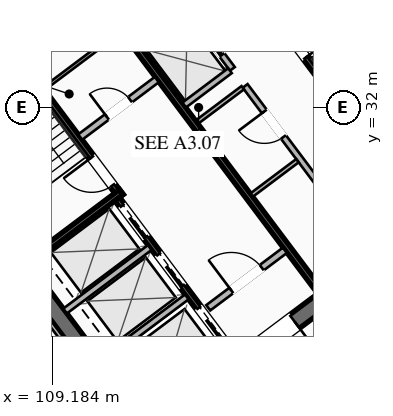
"""IFC4 building model, lengths in metres.
Left out: names, types, materials, properties, quantities, classifications, styles, units other than length and angle.
Written with IfcOpenShell. Run it as: python <this file> out.ifc"""

import sys

from ifc_helpers import new_model, si_unit, direction, frame, frame_2d, origin, place, context, subcontext, project, spatial, rectangle, extrude, element, fill, save


model = new_model("IFC4")
c1 = context("Model", 3, precision=1e-05, world=origin(), true_north=direction((0.0, 1.0)))
c2 = subcontext(c1, "Body", "Model", "MODEL_VIEW")
j1 = project(units=[si_unit("LENGTHUNIT", "METRE"), si_unit("PLANEANGLEUNIT", "RADIAN")], contexts=[c1])
p1 = place(None, origin())
s1 = spatial("IfcSite", under=j1, at=p1, CompositionType="ELEMENT")
p2 = place(p1, origin())
s2 = spatial("IfcBuilding", under=s1, at=p2, CompositionType="ELEMENT")
p3 = place(p2, frame((0.0, 0.0, 142.8)))
s3 = spatial("IfcBuildingStorey", under=s2, at=p3, CompositionType="ELEMENT", Elevation=142.8)
for number, where, z_axis, x_axis in (
    (1, (112.436, 21.077, 0.0), (0.0, 0.0, 1.0), (-0.6, 0.8, 0.0)),
    (2, (115.564, 42.923, 0.0), (0.0, 0.0, 1.0), (0.6, -0.8, 0.0)),
):
    element("IfcWall", number, at=place(p3, frame(where, z_axis=z_axis, x_axis=x_axis)), inside=s3, PredefinedType="SHEAR", context=c2, shape_type="SweptSolid", body=[
        extrude(rectangle(XDim=15.6, YDim=0.55, at=frame_2d((7.8, 0.0))), origin(), (0.0, 0.0, 1.0), 3.55),
    ])
p4 = place(p3, frame((124.539, 30.498, 0.0), z_axis=(0.0, 0.0, 1.0), x_axis=(-0.799998054672, -0.600002593761, 0.0)))
e3 = element("IfcWall", 3, at=p4, inside=s3, PredefinedType="SHEAR", context=c2, shape_type="SweptSolid", body=[
    extrude(rectangle(XDim=15.06, YDim=0.55, at=frame_2d((7.53, 0.0))), origin(), (0.0, 0.0, 1.0), 3.55),
])
p5 = place(p4, frame((9.23, 0.0, 0.0)))
e4 = element("IfcOpeningElement", 4, at=p5, cuts=e3, PredefinedType="OPENING", context=c2, shape_type="SweptSolid", body=[
    extrude(rectangle(XDim=1.25, YDim=2.25, at=frame_2d((0.625, 1.125))), frame((0.0, 0.285, 0.0), z_axis=(0.0, -1.0, 0.0), x_axis=(1.0, 0.0, 0.0)), (0.0, 0.0, 1.0), 0.57),
])
p6 = place(p4, frame((4.18, 0.0, 0.0)))
e5 = element("IfcOpeningElement", 5, at=p6, cuts=e3, PredefinedType="OPENING", context=c2, shape_type="SweptSolid", body=[
    extrude(rectangle(XDim=1.25, YDim=2.25, at=frame_2d((0.625, 1.125))), frame((0.0, 0.285, 0.0), z_axis=(0.0, -1.0, 0.0), x_axis=(1.0, 0.0, 0.0)), (0.0, 0.0, 1.0), 0.57),
])
p7 = place(p3, frame((103.461, 33.502, 0.0), z_axis=(0.0, 0.0, 1.0), x_axis=(0.799998054672, 0.600002593761, 0.0)))
e6 = element("IfcWall", 6, at=p7, inside=s3, PredefinedType="SHEAR", context=c2, shape_type="SweptSolid", body=[
    extrude(rectangle(XDim=15.06, YDim=0.55, at=frame_2d((7.53, 0.0))), origin(), (0.0, 0.0, 1.0), 3.55),
])
p8 = place(p7, frame((4.58, 0.0, 0.0)))
e7 = element("IfcOpeningElement", 7, at=p8, cuts=e6, PredefinedType="OPENING", context=c2, shape_type="SweptSolid", body=[
    extrude(rectangle(XDim=1.25, YDim=2.25, at=frame_2d((0.625, 1.125))), frame((0.0, 0.285, 0.0), z_axis=(0.0, -1.0, 0.0), x_axis=(1.0, 0.0, 0.0)), (0.0, 0.0, 1.0), 0.57),
])
p9 = place(p7, frame((9.63, 0.0, 0.0)))
e8 = element("IfcOpeningElement", 8, at=p9, cuts=e6, PredefinedType="OPENING", context=c2, shape_type="SweptSolid", body=[
    extrude(rectangle(XDim=1.25, YDim=2.25, at=frame_2d((0.625, 1.125))), frame((0.0, 0.285, 0.0), z_axis=(0.0, -1.0, 0.0), x_axis=(1.0, 0.0, 0.0)), (0.0, 0.0, 1.0), 0.57),
])
p10 = place(p3, frame((111.44, 29.08, 0.0), z_axis=(0.0, 0.0, 1.0), x_axis=(-0.59999029481, 0.8000072788, 0.0)))
e9 = element("IfcWall", 9, at=p10, inside=s3, PredefinedType="SHEAR", context=c2, shape_type="SweptSolid", body=[
    extrude(rectangle(XDim=8.05, YDim=0.2, at=frame_2d((4.025, 0.0))), origin(), (0.0, 0.0, 1.0), 3.37),
])
p11 = place(p10, frame((0.45, 0.0, 0.0)))
e10 = element("IfcOpeningElement", 10, at=p11, cuts=e9, PredefinedType="OPENING", context=c2, shape_type="SweptSolid", body=[
    extrude(rectangle(XDim=1.15, YDim=2.2, at=frame_2d((0.575, 1.1))), frame((0.0, 0.11, 0.0), z_axis=(0.0, -1.0, 0.0), x_axis=(1.0, 0.0, 0.0)), (0.0, 0.0, 1.0), 0.22),
])
p12 = place(p3, frame((108.396, 26.922, 0.0), z_axis=(0.0, 0.0, 1.0), x_axis=(0.800015298837, 0.599979601008, 0.0)))
e11 = element("IfcWall", 11, at=p12, inside=s3, PredefinedType="SHEAR", context=c2, shape_type="SweptSolid", body=[
    extrude(rectangle(XDim=3.83, YDim=0.2, at=frame_2d((1.915, 0.0))), origin(), (0.0, 0.0, 1.0), 3.37),
])
p13 = place(p3, frame((116.56, 34.92, 0.0), z_axis=(0.0, 0.0, 1.0), x_axis=(0.59999029481, -0.8000072788, 0.0)))
e12 = element("IfcWall", 12, at=p13, inside=s3, PredefinedType="SHEAR", context=c2, shape_type="SweptSolid", body=[
    extrude(rectangle(XDim=8.05, YDim=0.2, at=frame_2d((4.025, 0.0))), origin(), (0.0, 0.0, 1.0), 3.37),
])
p14 = place(p13, frame((0.45, 0.0, 0.0)))
e13 = element("IfcOpeningElement", 13, at=p14, cuts=e12, PredefinedType="OPENING", context=c2, shape_type="SweptSolid", body=[
    extrude(rectangle(XDim=1.15, YDim=2.2, at=frame_2d((0.575, 1.1))), frame((0.0, 0.11, 0.0), z_axis=(0.0, -1.0, 0.0), x_axis=(1.0, 0.0, 0.0)), (0.0, 0.0, 1.0), 0.22),
])
p15 = place(p3, frame((117.998, 25.936, 0.0), z_axis=(0.0, 0.0, 1.0), x_axis=(-0.600002693989, 0.799997979501, 0.0)))
e14 = element("IfcWall", 14, at=p15, inside=s3, PredefinedType="SHEAR", context=c2, shape_type="SweptSolid", body=[
    extrude(rectangle(XDim=14.5, YDim=0.2, at=frame_2d((7.25, 0.0))), origin(), (0.0, 0.0, 1.0), 3.37),
])
p16 = place(p3, frame((110.104, 31.028, 0.0), z_axis=(0.0, 0.0, 1.0), x_axis=(0.800018601094, 0.59997519774, 0.0)))
e15 = element("IfcWall", 15, at=p16, inside=s3, PredefinedType="SOLIDWALL", context=c2, shape_type="SweptSolid", body=[
    extrude(rectangle(XDim=3.15, YDim=0.22, at=frame_2d((1.575, 0.0))), origin(), (0.0, 0.0, 1.0), 2.723),
])
p17 = place(p16, frame((1.1, 0.0, 0.0)))
e16 = element("IfcOpeningElement", 16, at=p17, cuts=e15, PredefinedType="OPENING", context=c2, shape_type="SweptSolid", body=[
    extrude(rectangle(XDim=0.95, YDim=2.05, at=frame_2d((0.475, 1.025))), frame((0.0, 0.12, 0.0), z_axis=(0.0, -1.0, 0.0), x_axis=(1.0, 0.0, 0.0)), (0.0, 0.0, 1.0), 0.24),
])
p18 = place(p3, frame((114.316, 25.412, 0.0), z_axis=(0.0, 0.0, 1.0), x_axis=(0.800018601094, 0.59997519774, 0.0)))
e17 = element("IfcWall", 17, at=p18, inside=s3, PredefinedType="SOLIDWALL", context=c2, shape_type="SweptSolid", body=[
    extrude(rectangle(XDim=3.15, YDim=0.22, at=frame_2d((1.575, 0.0))), origin(), (0.0, 0.0, 1.0), 2.723),
])
p19 = place(p18, frame((0.95, 0.0, 0.0)))
e18 = element("IfcOpeningElement", 18, at=p19, cuts=e17, PredefinedType="OPENING", context=c2, shape_type="SweptSolid", body=[
    extrude(rectangle(XDim=1.25, YDim=2.25, at=frame_2d((0.625, 1.125))), frame((0.0, 0.12, 0.0), z_axis=(0.0, -1.0, 0.0), x_axis=(1.0, 0.0, 0.0)), (0.0, 0.0, 1.0), 0.24),
])
p20 = place(p3, frame((115.19, 23.83, 0.0), z_axis=(0.0, 0.0, 1.0), x_axis=(-0.599993943644, 0.800004542231, 0.0)))
e19 = element("IfcWall", 19, at=p20, inside=s3, PredefinedType="SHEAR", context=c2, shape_type="SweptSolid", body=[
    extrude(rectangle(XDim=6.45, YDim=0.2, at=frame_2d((3.225, 0.0))), origin(), (0.0, 0.0, 1.0), 3.37),
])
p21 = place(p20, frame((4.875, 0.0, 0.0)))
e20 = element("IfcOpeningElement", 20, at=p21, cuts=e19, PredefinedType="OPENING", context=c2, shape_type="SweptSolid", body=[
    extrude(rectangle(XDim=1.3, YDim=2.25, at=frame_2d((0.65, 1.125))), frame((0.0, 0.11, 0.0), z_axis=(0.0, -1.0, 0.0), x_axis=(1.0, 0.0, 0.0)), (0.0, 0.0, 1.0), 0.22),
])
p22 = place(p20, frame((2.875, 0.0, 0.0)))
e21 = element("IfcOpeningElement", 21, at=p22, cuts=e19, PredefinedType="OPENING", context=c2, shape_type="SweptSolid", body=[
    extrude(rectangle(XDim=1.3, YDim=2.25, at=frame_2d((0.65, 1.125))), frame((0.0, 0.11, 0.0), z_axis=(0.0, -1.0, 0.0), x_axis=(1.0, 0.0, 0.0)), (0.0, 0.0, 1.0), 0.22),
])
p23 = place(p20, frame((0.675, 0.0, 0.0)))
e22 = element("IfcOpeningElement", 22, at=p23, cuts=e19, PredefinedType="OPENING", context=c2, shape_type="SweptSolid", body=[
    extrude(rectangle(XDim=1.3, YDim=2.25, at=frame_2d((0.65, 1.125))), frame((0.0, 0.11, 0.0), z_axis=(0.0, -1.0, 0.0), x_axis=(1.0, 0.0, 0.0)), (0.0, 0.0, 1.0), 0.22),
])
for number, where, z_axis, x_axis in (
    (23, (110.826, 23.682, 0.0), (0.0, 0.0, 1.0), (0.8, 0.6, 0.0)),
    (24, (109.608, 25.306, 0.0), (0.0, 0.0, 1.0), (0.8, 0.6, 0.0)),
):
    element("IfcWall", number, at=place(p3, frame(where, z_axis=z_axis, x_axis=x_axis)), inside=s3, PredefinedType="SOLIDWALL", context=c2, shape_type="SweptSolid", body=[
        extrude(rectangle(XDim=3.48, YDim=0.2, at=frame_2d((1.74, 0.0))), origin(), (0.0, 0.0, 1.0), 3.37),
    ])
p24 = place(p3, frame((108.91, 32.62, 0.0), z_axis=(0.0, 0.0, 1.0), x_axis=(0.800018601094, 0.59997519774, 0.0)))
e25 = element("IfcWall", 25, at=p24, inside=s3, PredefinedType="PARTITIONING", context=c2, shape_type="SweptSolid", body=[
    extrude(rectangle(XDim=3.15, YDim=0.11, at=frame_2d((1.575, 0.0))), origin(), (0.0, 0.0, 1.0), 2.723),
])
p25 = place(p3, frame((119.67, 27.19, 0.0), z_axis=(0.0, 0.0, 1.0), x_axis=(-0.599988677396, 0.800008491828, 0.0)))
e26 = element("IfcWall", 26, at=p25, inside=s3, PredefinedType="SOLIDWALL", context=c2, shape_type="SweptSolid", body=[
    extrude(rectangle(XDim=6.9, YDim=0.2, at=frame_2d((3.45, 0.0))), origin(), (0.0, 0.0, 1.0), 2.723),
])
p26 = place(p25, frame((0.85, 0.0, 0.0)))
e27 = element("IfcOpeningElement", 27, at=p26, cuts=e26, PredefinedType="OPENING", context=c2, shape_type="SweptSolid", body=[
    extrude(rectangle(XDim=0.95, YDim=2.05, at=frame_2d((0.475, 1.025))), frame((0.0, 0.11, 0.0), z_axis=(0.0, -1.0, 0.0), x_axis=(1.0, 0.0, 0.0)), (0.0, 0.0, 1.0), 0.22),
])
p27 = place(p25, frame((4.8, 0.0, 0.0)))
e28 = element("IfcOpeningElement", 28, at=p27, cuts=e26, PredefinedType="OPENING", context=c2, shape_type="SweptSolid", body=[
    extrude(rectangle(XDim=1.05, YDim=2.2, at=frame_2d((0.525, 1.1))), frame((0.0, 0.11, 0.0), z_axis=(0.0, -1.0, 0.0), x_axis=(1.0, 0.0, 0.0)), (0.0, 0.0, 1.0), 0.22),
])
for number, where, z_axis, x_axis in (
    (29, (113.946, 31.522, 0.0), (0.0, 0.0, 1.0), (0.8, 0.6, 0.0)),
    (30, (115.746, 29.122, 0.0), (0.0, 0.0, 1.0), (0.8, 0.6, 0.0)),
):
    element("IfcWall", number, at=place(p3, frame(where, z_axis=z_axis, x_axis=x_axis)), inside=s3, PredefinedType="PARTITIONING", context=c2, shape_type="SweptSolid", body=[
        extrude(rectangle(XDim=1.88, YDim=0.135, at=frame_2d((0.94, 0.0))), origin(), (0.0, 0.0, 1.0), 2.723),
    ])
p28 = place(p3, frame((115.11, 33.27, 0.0), z_axis=(0.0, 0.0, 1.0), x_axis=(-0.600011322243, 0.799991508192, 0.0)))
e31 = element("IfcWall", 31, at=p28, inside=s3, PredefinedType="SOLIDWALL", context=c2, shape_type="SweptSolid", body=[
    extrude(rectangle(XDim=6.9, YDim=0.2, at=frame_2d((3.45, 0.0))), origin(), (0.0, 0.0, 1.0), 3.37),
])
p29 = place(p28, frame((0.575, 0.0, 0.0)))
e32 = element("IfcOpeningElement", 32, at=p29, cuts=e31, PredefinedType="OPENING", context=c2, shape_type="SweptSolid", body=[
    extrude(rectangle(XDim=1.1, YDim=2.2, at=frame_2d((0.55, 1.1))), frame((0.0, 0.11, 0.0), z_axis=(0.0, -1.0, 0.0), x_axis=(1.0, 0.0, 0.0)), (0.0, 0.0, 1.0), 0.22),
])
p30 = place(p28, frame((2.825, 0.0, 0.0)))
e33 = element("IfcOpeningElement", 33, at=p30, cuts=e31, PredefinedType="OPENING", context=c2, shape_type="SweptSolid", body=[
    extrude(rectangle(XDim=1.1, YDim=2.2, at=frame_2d((0.55, 1.1))), frame((0.0, 0.11, 0.0), z_axis=(0.0, -1.0, 0.0), x_axis=(1.0, 0.0, 0.0)), (0.0, 0.0, 1.0), 0.22),
])
p31 = place(p28, frame((5.075, 0.0, 0.0)))
e34 = element("IfcOpeningElement", 34, at=p31, cuts=e31, PredefinedType="OPENING", context=c2, shape_type="SweptSolid", body=[
    extrude(rectangle(XDim=1.1, YDim=2.2, at=frame_2d((0.55, 1.1))), frame((0.0, 0.11, 0.0), z_axis=(0.0, -1.0, 0.0), x_axis=(1.0, 0.0, 0.0)), (0.0, 0.0, 1.0), 0.22),
])
p32 = place(p3, frame((113.526, 32.082, 0.0), z_axis=(0.0, 0.0, 1.0), x_axis=(0.800046745961, 0.599937666993, 0.0)))
e35 = element("IfcWall", 35, at=p32, inside=s3, PredefinedType="SOLIDWALL", context=c2, shape_type="SweptSolid", body=[
    extrude(rectangle(XDim=1.88, YDim=0.2, at=frame_2d((0.94, 0.0))), origin(), (0.0, 0.0, 1.0), 3.37),
])
p33 = place(p3, frame((112.176, 33.882, 0.0), z_axis=(0.0, 0.0, 1.0), x_axis=(0.8, 0.6, 0.0)))
e36 = element("IfcWall", 36, at=p33, inside=s3, PredefinedType="SOLIDWALL", context=c2, shape_type="SweptSolid", body=[
    extrude(rectangle(XDim=1.88, YDim=0.2, at=frame_2d((0.94, 0.0))), origin(), (0.0, 0.0, 1.0), 3.37),
])
p34 = place(p3, frame((95.678, 30.346, 0.0), z_axis=(0.0, 0.0, 1.0), x_axis=(0.8, 0.6, 0.0)))
e37 = element("IfcWall", 37, at=p34, inside=s3, PredefinedType="PARTITIONING", context=c2, shape_type="SweptSolid", body=[
    extrude(rectangle(XDim=31.3, YDim=0.135, at=frame_2d((15.65, 0.0))), origin(), (0.0, 0.0, 1.0), 2.723),
])
p35 = place(p34, frame((0.3, 0.0, 0.0)))
e38 = element("IfcOpeningElement", 38, at=p35, cuts=e37, PredefinedType="OPENING", context=c2, shape_type="SweptSolid", body=[
    extrude(rectangle(XDim=0.95, YDim=2.05, at=frame_2d((0.475, 1.025))), frame((0.0, 0.077, 0.0), z_axis=(0.0, -1.0, 0.0), x_axis=(1.0, 0.0, 0.0)), (0.0, 0.0, 1.0), 0.155),
])
p36 = place(p34, frame((30.05, 0.0, 0.0)))
e39 = element("IfcOpeningElement", 39, at=p36, cuts=e37, PredefinedType="OPENING", context=c2, shape_type="SweptSolid", body=[
    extrude(rectangle(XDim=0.95, YDim=2.05, at=frame_2d((0.475, 1.025))), frame((0.0, 0.077, 0.0), z_axis=(0.0, -1.0, 0.0), x_axis=(1.0, 0.0, 0.0)), (0.0, 0.0, 1.0), 0.155),
])
p37 = place(p3, frame((132.13, 33.91, 0.0), z_axis=(0.0, 0.0, 1.0), x_axis=(-0.799997191971, -0.600003744021, 0.0)))
e40 = element("IfcWall", 40, at=p37, inside=s3, PredefinedType="PARTITIONING", context=c2, shape_type="SweptSolid", body=[
    extrude(rectangle(XDim=31.3, YDim=0.135, at=frame_2d((15.65, 0.0))), origin(), (0.0, 0.0, 1.0), 2.723),
])
p38 = place(p37, frame((29.97, 0.0, 0.0)))
e41 = element("IfcOpeningElement", 41, at=p38, cuts=e40, PredefinedType="OPENING", context=c2, shape_type="SweptSolid", body=[
    extrude(rectangle(XDim=0.95, YDim=2.05, at=frame_2d((0.475, 1.025))), frame((0.0, 0.077, 0.0), z_axis=(0.0, -1.0, 0.0), x_axis=(1.0, 0.0, 0.0)), (0.0, 0.0, 1.0), 0.155),
])
p39 = place(p37, frame((0.38, 0.0, 0.0)))
e42 = element("IfcOpeningElement", 42, at=p39, cuts=e40, PredefinedType="OPENING", context=c2, shape_type="SweptSolid", body=[
    extrude(rectangle(XDim=0.95, YDim=2.05, at=frame_2d((0.475, 1.025))), frame((0.0, 0.077, 0.0), z_axis=(0.0, -1.0, 0.0), x_axis=(1.0, 0.0, 0.0)), (0.0, 0.0, 1.0), 0.155),
])
p40 = place(p3, frame((112.104, 20.928, 0.0), z_axis=(0.0, 0.0, 1.0), x_axis=(-0.599994940075, 0.800003794918, 0.0)))
e43 = element("IfcWall", 43, at=p40, inside=s3, PredefinedType="PARTITIONING", context=c2, shape_type="SweptSolid", body=[
    extrude(rectangle(XDim=15.44, YDim=0.135, at=frame_2d((7.72, 0.0))), origin(), (0.0, 0.0, 1.0), 2.723),
])
p41 = place(p5, origin())
e44 = element("IfcDoor", 44, at=p41, inside=s3, OperationType="SINGLE_SWING_LEFT", PredefinedType="DOOR", context=c2, shape_type="SweptSolid", body=[
    extrude(rectangle(XDim=1.25, YDim=2.25, at=frame_2d((0.625, 1.125))), frame((0.0, 0.025, 0.0), z_axis=(0.0, -1.0, 0.0), x_axis=(1.0, 0.0, 0.0)), (0.0, 0.0, 1.0), 0.05),
])
fill(e4, e44)
p42 = place(p11, origin())
e45 = element("IfcDoor", 45, at=p42, inside=s3, OperationType="SINGLE_SWING_RIGHT", PredefinedType="DOOR", context=c2, shape_type="SweptSolid", body=[
    extrude(rectangle(XDim=1.15, YDim=2.2, at=frame_2d((0.575, 1.1))), frame((0.0, 0.025, 0.0), z_axis=(0.0, -1.0, 0.0), x_axis=(1.0, 0.0, 0.0)), (0.0, 0.0, 1.0), 0.05),
])
fill(e10, e45)
p43 = place(p14, origin())
e46 = element("IfcDoor", 46, at=p43, inside=s3, OperationType="SINGLE_SWING_RIGHT", PredefinedType="DOOR", context=c2, shape_type="SweptSolid", body=[
    extrude(rectangle(XDim=1.15, YDim=2.2, at=frame_2d((0.575, 1.1))), frame((0.0, 0.025, 0.0), z_axis=(0.0, -1.0, 0.0), x_axis=(1.0, 0.0, 0.0)), (0.0, 0.0, 1.0), 0.05),
])
fill(e13, e46)
p44 = place(p19, origin())
e47 = element("IfcDoor", 47, at=p44, inside=s3, OperationType="SINGLE_SWING_LEFT", PredefinedType="DOOR", context=c2, shape_type="SweptSolid", body=[
    extrude(rectangle(XDim=1.25, YDim=2.25, at=frame_2d((0.625, 1.125))), frame((0.0, 0.025, 0.0), z_axis=(0.0, -1.0, 0.0), x_axis=(1.0, 0.0, 0.0)), (0.0, 0.0, 1.0), 0.05),
])
fill(e18, e47)
p45 = place(p17, origin())
e48 = element("IfcDoor", 48, at=p45, inside=s3, OperationType="SINGLE_SWING_LEFT", PredefinedType="DOOR", context=c2, shape_type="SweptSolid", body=[
    extrude(rectangle(XDim=0.95, YDim=2.05, at=frame_2d((0.475, 1.025))), frame((0.0, 0.025, 0.0), z_axis=(0.0, -1.0, 0.0), x_axis=(1.0, 0.0, 0.0)), (0.0, 0.0, 1.0), 0.05),
])
fill(e16, e48)
p46 = place(p27, origin())
e49 = element("IfcDoor", 49, at=p46, inside=s3, OperationType="SINGLE_SWING_RIGHT", PredefinedType="DOOR", context=c2, shape_type="SweptSolid", body=[
    extrude(rectangle(XDim=1.05, YDim=2.2, at=frame_2d((0.525, 1.1))), frame((0.0, 0.025, 0.0), z_axis=(0.0, -1.0, 0.0), x_axis=(1.0, 0.0, 0.0)), (0.0, 0.0, 1.0), 0.05),
])
fill(e28, e49)
p47 = place(p21, origin())
e50 = element("IfcDoor", 50, at=p47, inside=s3, OperationType="SLIDING_TO_LEFT", PredefinedType="DOOR", context=c2, shape_type="SweptSolid", body=[
    extrude(rectangle(XDim=1.3, YDim=2.25, at=frame_2d((0.65, 1.125))), frame((0.0, 0.025, 0.0), z_axis=(0.0, -1.0, 0.0), x_axis=(1.0, 0.0, 0.0)), (0.0, 0.0, 1.0), 0.05),
])
fill(e20, e50)
p48 = place(p22, origin())
e51 = element("IfcDoor", 51, at=p48, inside=s3, OperationType="SLIDING_TO_LEFT", PredefinedType="DOOR", context=c2, shape_type="SweptSolid", body=[
    extrude(rectangle(XDim=1.3, YDim=2.25, at=frame_2d((0.65, 1.125))), frame((0.0, 0.025, 0.0), z_axis=(0.0, -1.0, 0.0), x_axis=(1.0, 0.0, 0.0)), (0.0, 0.0, 1.0), 0.05),
])
fill(e21, e51)
p49 = place(p23, origin())
e52 = element("IfcDoor", 52, at=p49, inside=s3, OperationType="SLIDING_TO_LEFT", PredefinedType="DOOR", context=c2, shape_type="SweptSolid", body=[
    extrude(rectangle(XDim=1.3, YDim=2.25, at=frame_2d((0.65, 1.125))), frame((0.0, 0.025, 0.0), z_axis=(0.0, -1.0, 0.0), x_axis=(1.0, 0.0, 0.0)), (0.0, 0.0, 1.0), 0.05),
])
fill(e22, e52)
p50 = place(p29, origin())
e53 = element("IfcDoor", 53, at=p50, inside=s3, OperationType="SLIDING_TO_LEFT", PredefinedType="DOOR", context=c2, shape_type="SweptSolid", body=[
    extrude(rectangle(XDim=1.1, YDim=2.2, at=frame_2d((0.55, 1.1))), frame((0.0, 0.025, 0.0), z_axis=(0.0, -1.0, 0.0), x_axis=(1.0, 0.0, 0.0)), (0.0, 0.0, 1.0), 0.05),
])
fill(e32, e53)
save(model, sys.argv[1])
